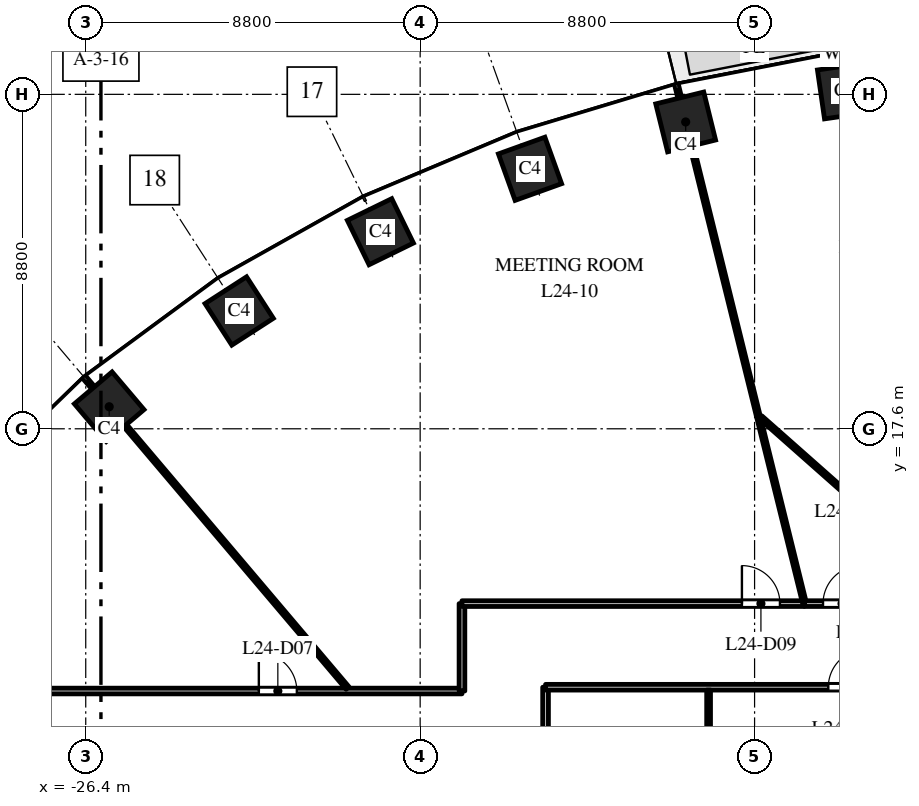
"""IFC4 building model, lengths in metres.
Left out: names, types, materials, properties, quantities, classifications, styles, units other than length and angle.
Written with IfcOpenShell. Run it as: python <this file> out.ifc"""

import sys

from ifc_helpers import new_model, si_unit, direction, frame, frame_2d, origin, origin_2d, place, context, subcontext, project, spatial, rectangle, extrude, element, fill, save


model = new_model("IFC4")
c1 = context("Model", 3, precision=1e-05, world=origin(), true_north=direction((0.0, 1.0)))
c2 = subcontext(c1, "Body", "Model", "MODEL_VIEW")
j1 = project(units=[si_unit("LENGTHUNIT", "METRE"), si_unit("PLANEANGLEUNIT", "RADIAN")], contexts=[c1])
p1 = place(None, origin())
s1 = spatial("IfcSite", under=j1, at=p1, CompositionType="ELEMENT")
p2 = place(p1, origin())
s2 = spatial("IfcBuilding", under=s1, at=p2, CompositionType="ELEMENT")
p3 = place(p2, frame((0.0, 0.0, 108.0)))
s3 = spatial("IfcBuildingStorey", under=s2, at=p3, CompositionType="ELEMENT", Elevation=108.0)
for number, where, z_axis, x_axis in (
    (1, (-6.409, 26.491, 0.0), (0.0, 0.0, 1.0), (-0.99, -0.143, 0.0)),
    (2, (-10.613, 25.674, 0.0), (0.0, 0.0, 1.0), (-0.971, -0.24, 0.0)),
    (3, (-14.709, 24.441, 0.0), (0.0, 0.0, 1.0), (-0.941, -0.338, 0.0)),
    (4, (-18.646, 22.785, 0.0), (0.0, 0.0, 1.0), (-0.898, -0.439, 0.0)),
    (5, (-22.362, 20.7, 0.0), (0.0, 0.0, 1.0), (-0.84, -0.542, 0.0)),
    (6, (-25.783, 18.18, 0.0), (0.0, 0.0, 1.0), (-0.763, -0.646, 0.0)),
):
    element("IfcColumn", number, at=place(p3, frame(where, z_axis=z_axis, x_axis=x_axis)), inside=s3, PredefinedType="COLUMN", context=c2, shape_type="SweptSolid", body=[
        extrude(rectangle(XDim=1.3, YDim=1.3, at=origin_2d()), origin(), (0.0, 0.0, 1.0), 4.0),
    ])
p4 = place(p3, frame((-2.166, 27.875, 0.0), z_axis=(0.0, 0.0, 1.0), x_axis=(-0.995473879823, -0.095035543824, 0.0)))
e7 = element("IfcWall", 7, at=p4, inside=s3, PredefinedType="STANDARD", context=c2, shape_type="SweptSolid", body=[
    extrude(rectangle(XDim=4.426, YDim=0.15, at=frame_2d((2.213, 0.0))), origin(), (0.0, 0.0, 1.0), 3.7),
])
p5 = place(p4, frame((1.713, 0.0, 0.0)))
e8 = element("IfcOpeningElement", 8, at=p5, cuts=e7, PredefinedType="OPENING", context=c2, shape_type="SweptSolid", body=[
    extrude(rectangle(XDim=1.0, YDim=2.4, at=frame_2d((0.5, 1.2))), frame((0.0, 0.085, 0.0), z_axis=(0.0, -1.0, 0.0), x_axis=(1.0, 0.0, 0.0)), (0.0, 0.0, 1.0), 0.17),
])
p6 = place(p3, frame((-31.5, 10.7, 0.0), z_axis=(0.0, 0.0, 1.0), x_axis=(1.0, 0.0, 0.0)))
e9 = element("IfcWall", 9, at=p6, inside=s3, PredefinedType="PARTITIONING", context=c2, shape_type="SweptSolid", body=[
    extrude(rectangle(XDim=15.0, YDim=0.15, at=frame_2d((7.5, 0.0))), origin(), (0.0, 0.0, 1.0), 3.1),
])
p7 = place(p6, frame((9.655, 0.0, 0.0)))
e10 = element("IfcOpeningElement", 10, at=p7, cuts=e9, PredefinedType="OPENING", context=c2, shape_type="SweptSolid", body=[
    extrude(rectangle(XDim=1.0, YDim=2.1, at=frame_2d((0.5, 1.05))), frame((0.0, 0.085, 0.0), z_axis=(0.0, -1.0, 0.0), x_axis=(1.0, 0.0, 0.0)), (0.0, 0.0, 1.0), 0.17),
])
p8 = place(p3, frame((-26.43, 18.945, 0.0), z_axis=(0.0, 0.0, 1.0), x_axis=(0.646400187952, -0.762998556365, 0.0)))
e11 = element("IfcWall", 11, at=p8, inside=s3, PredefinedType="PARTITIONING", context=c2, shape_type="SweptSolid", body=[
    extrude(rectangle(XDim=10.704, YDim=0.1, at=frame_2d((5.352, 0.0))), origin(), (0.0, 0.0, 1.0), 3.7),
])
p9 = place(p3, frame((-16.5, 10.7, 0.0), z_axis=(0.0, 0.0, 1.0), x_axis=(0.0, 1.0, 0.0)))
e12 = element("IfcWall", 12, at=p9, inside=s3, PredefinedType="PARTITIONING", context=c2, shape_type="SweptSolid", body=[
    extrude(rectangle(XDim=2.3, YDim=0.15, at=frame_2d((1.15, 0.0))), origin(), (0.0, 0.0, 1.0), 2.75),
])
p10 = place(p3, frame((-16.5, 13.0, 0.0), z_axis=(0.0, 0.0, 1.0), x_axis=(1.0, 0.0, 0.0)))
e13 = element("IfcWall", 13, at=p10, inside=s3, PredefinedType="PARTITIONING", context=c2, shape_type="SweptSolid", body=[
    extrude(rectangle(XDim=9.001, YDim=0.15, at=frame_2d((4.5, 0.0))), origin(), (0.0, 0.0, 1.0), 2.85),
])
p11 = place(p10, frame((7.367, 0.0, 0.0)))
e14 = element("IfcOpeningElement", 14, at=p11, cuts=e13, PredefinedType="OPENING", context=c2, shape_type="SweptSolid", body=[
    extrude(rectangle(XDim=1.0, YDim=2.1, at=frame_2d((0.5, 1.05))), frame((0.0, 0.085, 0.0), z_axis=(0.0, -1.0, 0.0), x_axis=(1.0, 0.0, 0.0)), (0.0, 0.0, 1.0), 0.17),
])
p12 = place(p3, frame((-14.3, -10.8, 0.0), z_axis=(0.0, 0.0, 1.0), x_axis=(0.0, 1.0, 0.0)))
e15 = element("IfcWall", 15, at=p12, inside=s3, PredefinedType="PARTITIONING", context=c2, shape_type="SweptSolid", body=[
    extrude(rectangle(XDim=21.6, YDim=0.15, at=frame_2d((10.8, 0.0))), origin(), (0.0, 0.0, 1.0), 2.75),
])
p13 = place(p12, frame((0.65, 0.0, 0.0)))
e16 = element("IfcOpeningElement", 16, at=p13, cuts=e15, PredefinedType="OPENING", context=c2, shape_type="SweptSolid", body=[
    extrude(rectangle(XDim=1.0, YDim=2.1, at=frame_2d((0.5, 1.05))), frame((0.0, 0.085, 0.0), z_axis=(0.0, -1.0, 0.0), x_axis=(1.0, 0.0, 0.0)), (0.0, 0.0, 1.0), 0.17),
])
p14 = place(p3, frame((-14.3, 10.8, 0.0), z_axis=(0.0, 0.0, 1.0), x_axis=(1.0, 0.0, 0.0)))
e17 = element("IfcWall", 17, at=p14, inside=s3, PredefinedType="PARTITIONING", context=c2, shape_type="SweptSolid", body=[
    extrude(rectangle(XDim=28.6, YDim=0.15, at=frame_2d((14.3, 0.0))), origin(), (0.0, 0.0, 1.0), 2.85),
])
p15 = place(p14, frame((7.44, 0.0, 0.0)))
e18 = element("IfcOpeningElement", 18, at=p15, cuts=e17, PredefinedType="OPENING", context=c2, shape_type="SweptSolid", body=[
    extrude(rectangle(XDim=1.0, YDim=2.1, at=frame_2d((0.5, 1.05))), frame((0.0, 0.085, 0.0), z_axis=(0.0, -1.0, 0.0), x_axis=(1.0, 0.0, 0.0)), (0.0, 0.0, 1.0), 0.17),
])
p16 = place(p14, frame((12.207, 0.0, 0.0)))
e19 = element("IfcOpeningElement", 19, at=p16, cuts=e17, PredefinedType="OPENING", context=c2, shape_type="SweptSolid", body=[
    extrude(rectangle(XDim=1.0, YDim=2.1, at=frame_2d((0.5, 1.05))), frame((0.0, 0.085, 0.0), z_axis=(0.0, -1.0, 0.0), x_axis=(1.0, 0.0, 0.0)), (0.0, 0.0, 1.0), 0.17),
])
p17 = place(p14, frame((16.973, 0.0, 0.0)))
e20 = element("IfcOpeningElement", 20, at=p17, cuts=e17, PredefinedType="OPENING", context=c2, shape_type="SweptSolid", body=[
    extrude(rectangle(XDim=1.0, YDim=2.1, at=frame_2d((0.5, 1.05))), frame((0.0, 0.085, 0.0), z_axis=(0.0, -1.0, 0.0), x_axis=(1.0, 0.0, 0.0)), (0.0, 0.0, 1.0), 0.17),
])
p18 = place(p3, frame((-10.853, 26.646, 0.0), z_axis=(0.0, 0.0, 1.0), x_axis=(0.239763745499, -0.97083126564, 0.0)))
e21 = element("IfcWall", 21, at=p18, inside=s3, PredefinedType="PARTITIONING", context=c2, shape_type="SweptSolid", body=[
    extrude(rectangle(XDim=14.056, YDim=0.1, at=frame_2d((7.028, 0.0))), origin(), (0.0, 0.0, 1.0), 2.85),
])
p19 = place(p3, frame((-10.01, -10.725, 0.0), z_axis=(0.0, 0.0, 1.0), x_axis=(0.0, 1.0, 0.0)))
e22 = element("IfcWall", 22, at=p19, inside=s3, PredefinedType="PARTITIONING", context=c2, shape_type="SweptSolid", body=[
    extrude(rectangle(XDim=21.45, YDim=0.1, at=frame_2d((10.725, 0.0))), origin(), (0.0, 0.0, 1.0), 2.75),
])
p20 = place(p3, frame((-8.642, 17.903, 0.0), z_axis=(0.0, 0.0, 1.0), x_axis=(0.749027274438, -0.662539162728, 0.0)))
e23 = element("IfcWall", 23, at=p20, inside=s3, PredefinedType="PARTITIONING", context=c2, shape_type="SweptSolid", body=[
    extrude(rectangle(XDim=7.283, YDim=0.1, at=frame_2d((3.642, 0.0))), origin(), (0.0, 0.0, 1.0), 2.85),
])
p21 = place(p3, frame((-7.483, 13.0, 0.0), z_axis=(0.0, 0.0, 1.0), x_axis=(1.0, 0.0, 0.0)))
e24 = element("IfcWall", 24, at=p21, inside=s3, PredefinedType="PARTITIONING", context=c2, shape_type="SweptSolid", body=[
    extrude(rectangle(XDim=7.184, YDim=0.15, at=frame_2d((3.592, 0.0))), origin(), (0.0, 0.0, 1.0), 2.85),
])
p22 = place(p21, frame((4.933, 0.0, 0.0)))
e25 = element("IfcOpeningElement", 25, at=p22, cuts=e24, PredefinedType="OPENING", context=c2, shape_type="SweptSolid", body=[
    extrude(rectangle(XDim=1.0, YDim=2.1, at=frame_2d((0.5, 1.05))), frame((0.0, 0.085, 0.0), z_axis=(0.0, -1.0, 0.0), x_axis=(1.0, 0.0, 0.0)), (0.0, 0.0, 1.0), 0.17),
])
p23 = place(p21, frame((0.484, 0.0, 0.0)))
e26 = element("IfcOpeningElement", 26, at=p23, cuts=e24, PredefinedType="OPENING", context=c2, shape_type="SweptSolid", body=[
    extrude(rectangle(XDim=1.0, YDim=2.1, at=frame_2d((0.5, 1.05))), frame((0.0, 0.085, 0.0), z_axis=(0.0, -1.0, 0.0), x_axis=(1.0, 0.0, 0.0)), (0.0, 0.0, 1.0), 0.17),
])
p24 = place(p7, origin())
e27 = element("IfcDoor", 27, at=p24, inside=s3, OperationType="SINGLE_SWING_LEFT", PredefinedType="DOOR", context=c2, shape_type="SweptSolid", body=[
    extrude(rectangle(XDim=1.0, YDim=2.1, at=frame_2d((0.5, 1.05))), frame((0.0, 0.025, 0.0), z_axis=(0.0, -1.0, 0.0), x_axis=(1.0, 0.0, 0.0)), (0.0, 0.0, 1.0), 0.05),
])
fill(e10, e27)
p25 = place(p11, origin())
e28 = element("IfcDoor", 28, at=p25, inside=s3, OperationType="SINGLE_SWING_LEFT", PredefinedType="DOOR", context=c2, shape_type="SweptSolid", body=[
    extrude(rectangle(XDim=1.0, YDim=2.1, at=frame_2d((0.5, 1.05))), frame((0.0, 0.025, 0.0), z_axis=(0.0, -1.0, 0.0), x_axis=(1.0, 0.0, 0.0)), (0.0, 0.0, 1.0), 0.05),
])
fill(e14, e28)
p26 = place(p23, origin())
e29 = element("IfcDoor", 29, at=p26, inside=s3, OperationType="SINGLE_SWING_RIGHT", PredefinedType="DOOR", context=c2, shape_type="SweptSolid", body=[
    extrude(rectangle(XDim=1.0, YDim=2.1, at=frame_2d((0.5, 1.05))), frame((0.0, 0.025, 0.0), z_axis=(0.0, -1.0, 0.0), x_axis=(1.0, 0.0, 0.0)), (0.0, 0.0, 1.0), 0.05),
])
fill(e26, e29)
p27 = place(p15, origin())
e30 = element("IfcDoor", 30, at=p27, inside=s3, OperationType="SINGLE_SWING_RIGHT", PredefinedType="DOOR", context=c2, shape_type="SweptSolid", body=[
    extrude(rectangle(XDim=1.0, YDim=2.1, at=frame_2d((0.5, 1.05))), frame((0.0, 0.025, 0.0), z_axis=(0.0, -1.0, 0.0), x_axis=(1.0, 0.0, 0.0)), (0.0, 0.0, 1.0), 0.05),
])
fill(e18, e30)
save(model, sys.argv[1])
